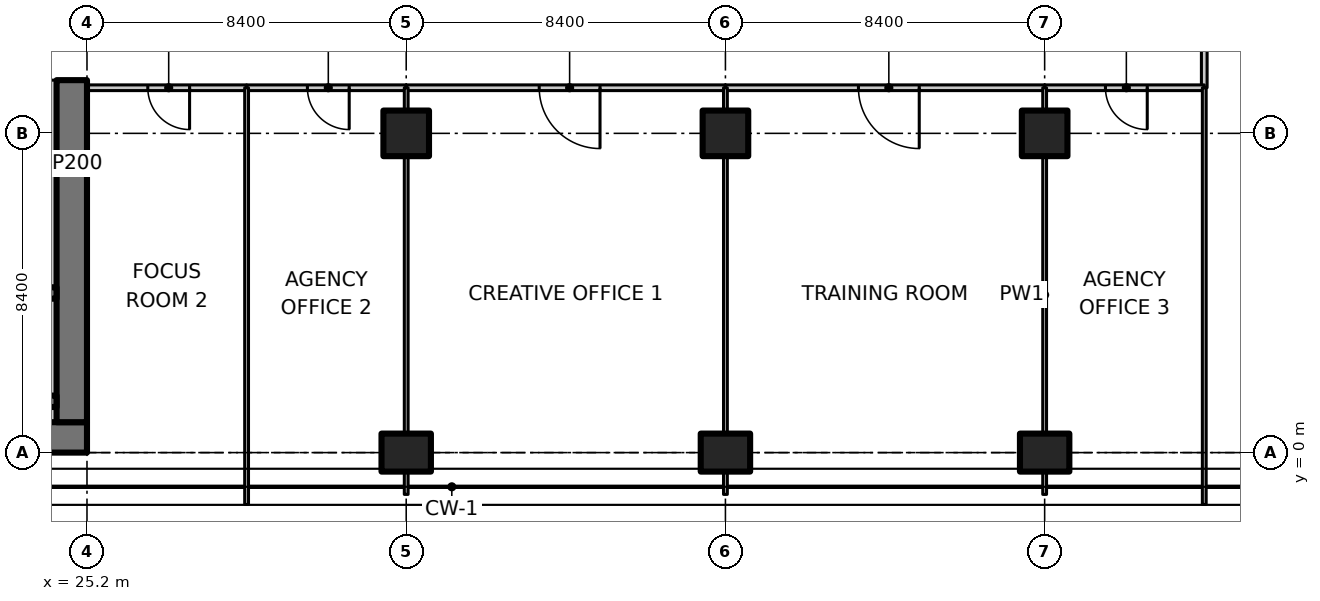
"""IFC4 building model, lengths in metres.
Left out: names, types, materials, properties, quantities, classifications, styles, units other than length and angle.
Written with IfcOpenShell. Run it as: python <this file> out.ifc"""

import sys

from ifc_helpers import new_model, si_unit, direction, frame, frame_2d, origin, origin_2d, place, context, subcontext, project, spatial, polyline, rectangle, outline, extrude, element, fill, save


model = new_model("IFC4")
c1 = context("Model", 3, precision=1e-05, world=origin(), true_north=direction((0.0, 1.0)))
c2 = subcontext(c1, "Body", "Model", "MODEL_VIEW")
j1 = project(units=[si_unit("LENGTHUNIT", "METRE"), si_unit("PLANEANGLEUNIT", "RADIAN")], contexts=[c1])
p1 = place(None, origin())
s1 = spatial("IfcSite", under=j1, at=p1, CompositionType="ELEMENT")
p2 = place(p1, origin())
s2 = spatial("IfcBuilding", under=s1, at=p2, CompositionType="ELEMENT")
p3 = place(p2, frame((0.0, 0.0, 116.9)))
s3 = spatial("IfcBuildingStorey", under=s2, at=p3, CompositionType="ELEMENT", Elevation=116.9)
p4 = place(p3, frame((33.6, 0.0, 0.0), z_axis=(0.0, 0.0, 1.0), x_axis=(0.0, 1.0, 0.0)))
e1 = element("IfcColumn", 1, at=p4, inside=s3, PredefinedType="COLUMN", context=c2, shape_type="SweptSolid", body=[
    extrude(rectangle(XDim=1.0, YDim=1.3, at=origin_2d()), origin(), (0.0, 0.0, 1.0), 3.35),
])
p5 = place(p3, frame((33.6, 8.4, 0.0), z_axis=(0.0, 0.0, 1.0), x_axis=(1.0, 0.0, 0.0)))
e2 = element("IfcColumn", 2, at=p5, inside=s3, PredefinedType="COLUMN", context=c2, shape_type="SweptSolid", body=[
    extrude(rectangle(XDim=1.2, YDim=1.2, at=origin_2d()), origin(), (0.0, 0.0, 1.0), 3.35),
])
p6 = place(p3, frame((42.0, 0.0, 0.0), z_axis=(0.0, 0.0, 1.0), x_axis=(0.0, 1.0, 0.0)))
e3 = element("IfcColumn", 3, at=p6, inside=s3, PredefinedType="COLUMN", context=c2, shape_type="SweptSolid", body=[
    extrude(rectangle(XDim=1.0, YDim=1.3, at=origin_2d()), origin(), (0.0, 0.0, 1.0), 3.35),
])
p7 = place(p3, frame((42.0, 8.4, 0.0), z_axis=(0.0, 0.0, 1.0), x_axis=(1.0, 0.0, 0.0)))
e4 = element("IfcColumn", 4, at=p7, inside=s3, PredefinedType="COLUMN", context=c2, shape_type="SweptSolid", body=[
    extrude(rectangle(XDim=1.2, YDim=1.2, at=origin_2d()), origin(), (0.0, 0.0, 1.0), 3.35),
])
p8 = place(p3, frame((50.4, 0.0, 0.0), z_axis=(0.0, 0.0, 1.0), x_axis=(0.0, 1.0, 0.0)))
e5 = element("IfcColumn", 5, at=p8, inside=s3, PredefinedType="COLUMN", context=c2, shape_type="SweptSolid", body=[
    extrude(rectangle(XDim=1.0, YDim=1.3, at=origin_2d()), origin(), (0.0, 0.0, 1.0), 3.35),
])
p9 = place(p3, frame((50.4, 8.4, 0.0), z_axis=(0.0, 0.0, 1.0), x_axis=(1.0, 0.0, 0.0)))
e6 = element("IfcColumn", 6, at=p9, inside=s3, PredefinedType="COLUMN", context=c2, shape_type="SweptSolid", body=[
    extrude(rectangle(XDim=1.2, YDim=1.2, at=origin_2d()), origin(), (0.0, 0.0, 1.0), 3.35),
])
p10 = place(p3, frame((7.136, 0.4, 0.0), z_axis=(0.0, 0.0, 1.0), x_axis=(1.0, 0.0, 0.0)))
e7 = element("IfcWall", 7, at=p10, inside=s3, PredefinedType="SHEAR", context=c2, shape_type="SweptSolid", body=[
    extrude(rectangle(XDim=18.063, YDim=0.8, at=frame_2d((9.032, 0.0))), origin(), (0.0, 0.0, 1.0), 3.35),
])
p11 = place(p3, frame((24.8, 0.8, 0.0), z_axis=(0.0, 0.0, 1.0), x_axis=(0.0, 1.0, 0.0)))
e8 = element("IfcWall", 8, at=p11, inside=s3, PredefinedType="SHEAR", context=c2, shape_type="SweptSolid", body=[
    extrude(rectangle(XDim=9.0, YDim=0.8, at=frame_2d((4.5, 0.0))), origin(), (0.0, 0.0, 1.0), 3.35),
])
p12 = place(p3, frame((15.8, 1.35, 0.0), z_axis=(0.0, 0.0, 1.0), x_axis=(1.0, 0.0, 0.0)))
e9 = element("IfcWall", 9, at=p12, inside=s3, PredefinedType="SHEAR", context=c2, shape_type="SweptSolid", body=[
    extrude(rectangle(XDim=8.6, YDim=0.3, at=frame_2d((4.3, 0.0))), origin(), (0.0, 0.0, 1.0), 3.35),
])
p13 = place(p3, frame((15.8, 4.2, 0.0), z_axis=(0.0, 0.0, 1.0), x_axis=(1.0, 0.0, 0.0)))
e10 = element("IfcWall", 10, at=p13, inside=s3, PredefinedType="SHEAR", context=c2, shape_type="SweptSolid", body=[
    extrude(rectangle(XDim=8.6, YDim=0.3, at=frame_2d((4.3, 0.0))), origin(), (0.0, 0.0, 1.0), 3.35),
])
p14 = place(p13, frame((0.4, 0.0, 0.0)))
e11 = element("IfcOpeningElement", 11, at=p14, cuts=e10, PredefinedType="OPENING", context=c2, shape_type="SweptSolid", body=[
    extrude(rectangle(XDim=1.0, YDim=2.1, at=frame_2d((0.5, 1.05))), frame((0.0, 0.16, 0.0), z_axis=(0.0, -1.0, 0.0), x_axis=(1.0, 0.0, 0.0)), (0.0, 0.0, 1.0), 0.32),
])
p15 = place(p3, frame((13.35, 1.0, 0.0), z_axis=(0.0, 0.0, 1.0), x_axis=(1.0, 0.0, 0.0)))
e12 = element("IfcWall", 12, at=p15, inside=s3, PredefinedType="PARTITIONING", context=c2, shape_type="SweptSolid", body=[
    extrude(rectangle(XDim=11.05, YDim=0.4, at=frame_2d((5.525, 0.0))), origin(), (0.0, 0.0, 1.0), 3.35),
])
p16 = place(p3, frame((24.2, 1.5, 0.0), z_axis=(0.0, 0.0, 1.0), x_axis=(0.0, 1.0, 0.0)))
e13 = element("IfcWall", 13, at=p16, inside=s3, PredefinedType="PARTITIONING", context=c2, shape_type="SweptSolid", body=[
    extrude(rectangle(XDim=2.55, YDim=0.4, at=frame_2d((1.275, 0.0))), origin(), (0.0, 0.0, 1.0), 3.35),
])
p17 = place(p3, frame((24.2, 4.35, 0.0), z_axis=(0.0, 0.0, 1.0), x_axis=(0.0, 1.0, 0.0)))
e14 = element("IfcWall", 14, at=p17, inside=s3, PredefinedType="PARTITIONING", context=c2, shape_type="SweptSolid", body=[
    extrude(rectangle(XDim=5.45, YDim=0.4, at=frame_2d((2.725, 0.0))), origin(), (0.0, 0.0, 1.0), 3.35),
])
p18 = place(p3, frame((29.4, 9.6, 0.0), z_axis=(0.0, 0.0, 1.0), x_axis=(-1.0, 0.0, 0.0)))
e15 = element("IfcWall", 15, at=p18, inside=s3, PredefinedType="PARTITIONING", context=c2, shape_type="SweptSolid", body=[
    extrude(rectangle(XDim=4.2, YDim=0.15, at=frame_2d((2.1, 0.0))), origin(), (0.0, 0.0, 1.0), 3.33),
])
p19 = place(p18, frame((1.5, 0.0, 0.0)))
e16 = element("IfcOpeningElement", 16, at=p19, cuts=e15, PredefinedType="OPENING", context=c2, shape_type="SweptSolid", body=[
    extrude(rectangle(XDim=1.1, YDim=2.1, at=frame_2d((0.55, 1.05))), frame((0.0, 0.085, 0.0), z_axis=(0.0, -1.0, 0.0), x_axis=(1.0, 0.0, 0.0)), (0.0, 0.0, 1.0), 0.17),
])
p20 = place(p3, frame((54.6, 13.0, 0.0), z_axis=(0.0, 0.0, 1.0), x_axis=(0.0, -1.0, 0.0)))
e17 = element("IfcWall", 17, at=p20, inside=s3, PredefinedType="PARTITIONING", context=c2, shape_type="SweptSolid", body=[
    extrude(rectangle(XDim=3.4, YDim=0.15, at=frame_2d((1.7, 0.0))), origin(), (0.0, 0.0, 1.0), 3.33),
])
p21 = place(p3, frame((33.6, 9.6, 0.0), z_axis=(0.0, 0.0, 1.0), x_axis=(-1.0, 0.0, 0.0)))
e18 = element("IfcWall", 18, at=p21, inside=s3, PredefinedType="PARTITIONING", context=c2, shape_type="SweptSolid", body=[
    extrude(rectangle(XDim=4.2, YDim=0.15, at=frame_2d((2.1, 0.0))), origin(), (0.0, 0.0, 1.0), 3.33),
])
p22 = place(p21, frame((1.5, 0.0, 0.0)))
e19 = element("IfcOpeningElement", 19, at=p22, cuts=e18, PredefinedType="OPENING", context=c2, shape_type="SweptSolid", body=[
    extrude(rectangle(XDim=1.1, YDim=2.1, at=frame_2d((0.55, 1.05))), frame((0.0, 0.085, 0.0), z_axis=(0.0, -1.0, 0.0), x_axis=(1.0, 0.0, 0.0)), (0.0, 0.0, 1.0), 0.17),
])
p23 = place(p3, frame((42.0, 9.6, 0.0), z_axis=(0.0, 0.0, 1.0), x_axis=(-1.0, 0.0, 0.0)))
e20 = element("IfcWall", 20, at=p23, inside=s3, PredefinedType="PARTITIONING", context=c2, shape_type="SweptSolid", body=[
    extrude(rectangle(XDim=8.4, YDim=0.15, at=frame_2d((4.2, 0.0))), origin(), (0.0, 0.0, 1.0), 3.33),
])
p24 = place(p23, frame((3.3, 0.0, 0.0)))
e21 = element("IfcOpeningElement", 21, at=p24, cuts=e20, PredefinedType="OPENING", context=c2, shape_type="SweptSolid", body=[
    extrude(rectangle(XDim=1.6, YDim=2.1, at=frame_2d((0.8, 1.05))), frame((0.0, 0.085, 0.0), z_axis=(0.0, -1.0, 0.0), x_axis=(1.0, 0.0, 0.0)), (0.0, 0.0, 1.0), 0.17),
])
p25 = place(p3, frame((50.4, 9.6, 0.0), z_axis=(0.0, 0.0, 1.0), x_axis=(-1.0, 0.0, 0.0)))
e22 = element("IfcWall", 22, at=p25, inside=s3, PredefinedType="PARTITIONING", context=c2, shape_type="SweptSolid", body=[
    extrude(rectangle(XDim=8.4, YDim=0.15, at=frame_2d((4.2, 0.0))), origin(), (0.0, 0.0, 1.0), 3.33),
])
p26 = place(p25, frame((3.3, 0.0, 0.0)))
e23 = element("IfcOpeningElement", 23, at=p26, cuts=e22, PredefinedType="OPENING", context=c2, shape_type="SweptSolid", body=[
    extrude(rectangle(XDim=1.6, YDim=2.1, at=frame_2d((0.8, 1.05))), frame((0.0, 0.085, 0.0), z_axis=(0.0, -1.0, 0.0), x_axis=(1.0, 0.0, 0.0)), (0.0, 0.0, 1.0), 0.17),
])
p27 = place(p3, frame((54.6, 9.6, 0.0), z_axis=(0.0, 0.0, 1.0), x_axis=(-1.0, 0.0, 0.0)))
e24 = element("IfcWall", 24, at=p27, inside=s3, PredefinedType="PARTITIONING", context=c2, shape_type="SweptSolid", body=[
    extrude(rectangle(XDim=4.2, YDim=0.15, at=frame_2d((2.1, 0.0))), origin(), (0.0, 0.0, 1.0), 3.33),
])
p28 = place(p27, frame((1.5, 0.0, 0.0)))
e25 = element("IfcOpeningElement", 25, at=p28, cuts=e24, PredefinedType="OPENING", context=c2, shape_type="SweptSolid", body=[
    extrude(rectangle(XDim=1.1, YDim=2.1, at=frame_2d((0.55, 1.05))), frame((0.0, 0.085, 0.0), z_axis=(0.0, -1.0, 0.0), x_axis=(1.0, 0.0, 0.0)), (0.0, 0.0, 1.0), 0.17),
])
p29 = place(p3, frame((54.6, -1.365, 0.0), z_axis=(0.0, 0.0, 1.0), x_axis=(0.0, 1.0, 0.0)))
e26 = element("IfcWall", 26, at=p29, inside=s3, PredefinedType="PARTITIONING", context=c2, shape_type="SweptSolid", body=[
    extrude(outline(polyline([(0.0, 0.0), (10.965, 0.0), (10.965, 3.33), (1.815, 3.33), (1.813, 2.98), (0.917, 2.98), (0.915, 3.33), (0.265, 3.33), (0.0, 3.33), (0.0, 0.0)])), frame((0.0, 0.05, 0.0), z_axis=(0.0, -1.0, 0.0), x_axis=(1.0, 0.0, 0.0)), (0.0, 0.0, 1.0), 0.1),
])
p30 = place(p3, frame((29.4, 9.6, 0.0), z_axis=(0.0, 0.0, 1.0), x_axis=(0.0, -1.0, 0.0)))
e27 = element("IfcWall", 27, at=p30, inside=s3, PredefinedType="PARTITIONING", context=c2, shape_type="SweptSolid", body=[
    extrude(outline(polyline([(0.0, 0.0), (10.965, 0.0), (10.965, 3.33), (10.7, 3.33), (10.05, 3.33), (10.048, 2.98), (9.152, 2.98), (9.15, 3.33), (0.0, 3.33), (0.0, 0.0)])), frame((0.0, 0.05, 0.0), z_axis=(0.0, -1.0, 0.0), x_axis=(1.0, 0.0, 0.0)), (0.0, 0.0, 1.0), 0.1),
])
p31 = place(p3, frame((33.6, 9.6, 0.0), z_axis=(0.0, 0.0, 1.0), x_axis=(0.0, -1.0, 0.0)))
e28 = element("IfcWall", 28, at=p31, inside=s3, PredefinedType="PARTITIONING", context=c2, shape_type="SweptSolid", body=[
    extrude(rectangle(XDim=0.58, YDim=0.1, at=frame_2d((0.29, 0.0))), origin(), (0.0, 0.0, 1.0), 3.33),
])
p32 = place(p3, frame((33.6, 7.78, 0.0), z_axis=(0.0, 0.0, 1.0), x_axis=(0.0, -1.0, 0.0)))
e29 = element("IfcWall", 29, at=p32, inside=s3, PredefinedType="PARTITIONING", context=c2, shape_type="SweptSolid", body=[
    extrude(rectangle(XDim=7.26, YDim=0.1, at=frame_2d((3.63, 0.0))), origin(), (0.0, 0.0, 1.0), 3.33),
])
for number, where, z_axis, x_axis in (
    (30, (33.6, -0.52, 0.0), (0.0, 0.0, 1.0), (0.0, -1.0, 0.0)),
    (31, (42.0, 9.6, 0.0), (0.0, 0.0, 1.0), (0.0, -1.0, 0.0)),
):
    element("IfcWall", number, at=place(p3, frame(where, z_axis=z_axis, x_axis=x_axis)), inside=s3, PredefinedType="PARTITIONING", context=c2, shape_type="SweptSolid", body=[
        extrude(rectangle(XDim=0.58, YDim=0.1, at=frame_2d((0.29, 0.0))), origin(), (0.0, 0.0, 1.0), 3.33),
    ])
p33 = place(p3, frame((42.0, 7.78, 0.0), z_axis=(0.0, 0.0, 1.0), x_axis=(0.0, -1.0, 0.0)))
e32 = element("IfcWall", 32, at=p33, inside=s3, PredefinedType="PARTITIONING", context=c2, shape_type="SweptSolid", body=[
    extrude(rectangle(XDim=7.26, YDim=0.1, at=frame_2d((3.63, 0.0))), origin(), (0.0, 0.0, 1.0), 3.33),
])
for number, where, z_axis, x_axis in (
    (33, (42.0, -0.52, 0.0), (0.0, 0.0, 1.0), (0.0, -1.0, 0.0)),
    (34, (50.4, 9.6, 0.0), (0.0, 0.0, 1.0), (0.0, -1.0, 0.0)),
):
    element("IfcWall", number, at=place(p3, frame(where, z_axis=z_axis, x_axis=x_axis)), inside=s3, PredefinedType="PARTITIONING", context=c2, shape_type="SweptSolid", body=[
        extrude(rectangle(XDim=0.58, YDim=0.1, at=frame_2d((0.29, 0.0))), origin(), (0.0, 0.0, 1.0), 3.33),
    ])
p34 = place(p3, frame((50.4, 7.78, 0.0), z_axis=(0.0, 0.0, 1.0), x_axis=(0.0, -1.0, 0.0)))
e35 = element("IfcWall", 35, at=p34, inside=s3, PredefinedType="PARTITIONING", context=c2, shape_type="SweptSolid", body=[
    extrude(rectangle(XDim=7.26, YDim=0.1, at=frame_2d((3.63, 0.0))), origin(), (0.0, 0.0, 1.0), 3.33),
])
p35 = place(p3, frame((50.4, -0.52, 0.0), z_axis=(0.0, 0.0, 1.0), x_axis=(0.0, -1.0, 0.0)))
e36 = element("IfcWall", 36, at=p35, inside=s3, PredefinedType="PARTITIONING", context=c2, shape_type="SweptSolid", body=[
    extrude(rectangle(XDim=0.58, YDim=0.1, at=frame_2d((0.29, 0.0))), origin(), (0.0, 0.0, 1.0), 3.33),
])
p36 = place(p19, origin())
e37 = element("IfcDoor", 37, at=p36, inside=s3, OperationType="SINGLE_SWING_LEFT", PredefinedType="DOOR", context=c2, shape_type="SweptSolid", body=[
    extrude(rectangle(XDim=1.1, YDim=2.1, at=frame_2d((0.55, 1.05))), frame((0.0, 0.025, 0.0), z_axis=(0.0, -1.0, 0.0), x_axis=(1.0, 0.0, 0.0)), (0.0, 0.0, 1.0), 0.05),
])
fill(e16, e37)
p37 = place(p22, origin())
e38 = element("IfcDoor", 38, at=p37, inside=s3, OperationType="SINGLE_SWING_LEFT", PredefinedType="DOOR", context=c2, shape_type="SweptSolid", body=[
    extrude(rectangle(XDim=1.1, YDim=2.1, at=frame_2d((0.55, 1.05))), frame((0.0, 0.025, 0.0), z_axis=(0.0, -1.0, 0.0), x_axis=(1.0, 0.0, 0.0)), (0.0, 0.0, 1.0), 0.05),
])
fill(e19, e38)
p38 = place(p24, origin())
e39 = element("IfcDoor", 39, at=p38, inside=s3, OperationType="DOUBLE_DOOR_SINGLE_SWING", PredefinedType="DOOR", context=c2, shape_type="SweptSolid", body=[
    extrude(rectangle(XDim=1.6, YDim=2.1, at=frame_2d((0.8, 1.05))), frame((0.0, 0.025, 0.0), z_axis=(0.0, -1.0, 0.0), x_axis=(1.0, 0.0, 0.0)), (0.0, 0.0, 1.0), 0.05),
])
fill(e21, e39)
p39 = place(p26, origin())
e40 = element("IfcDoor", 40, at=p39, inside=s3, OperationType="DOUBLE_DOOR_SINGLE_SWING", PredefinedType="DOOR", context=c2, shape_type="SweptSolid", body=[
    extrude(rectangle(XDim=1.6, YDim=2.1, at=frame_2d((0.8, 1.05))), frame((0.0, 0.025, 0.0), z_axis=(0.0, -1.0, 0.0), x_axis=(1.0, 0.0, 0.0)), (0.0, 0.0, 1.0), 0.05),
])
fill(e23, e40)
p40 = place(p28, origin())
e41 = element("IfcDoor", 41, at=p40, inside=s3, OperationType="SINGLE_SWING_LEFT", PredefinedType="DOOR", context=c2, shape_type="SweptSolid", body=[
    extrude(rectangle(XDim=1.1, YDim=2.1, at=frame_2d((0.55, 1.05))), frame((0.0, 0.025, 0.0), z_axis=(0.0, -1.0, 0.0), x_axis=(1.0, 0.0, 0.0)), (0.0, 0.0, 1.0), 0.05),
])
fill(e25, e41)
save(model, sys.argv[1])
